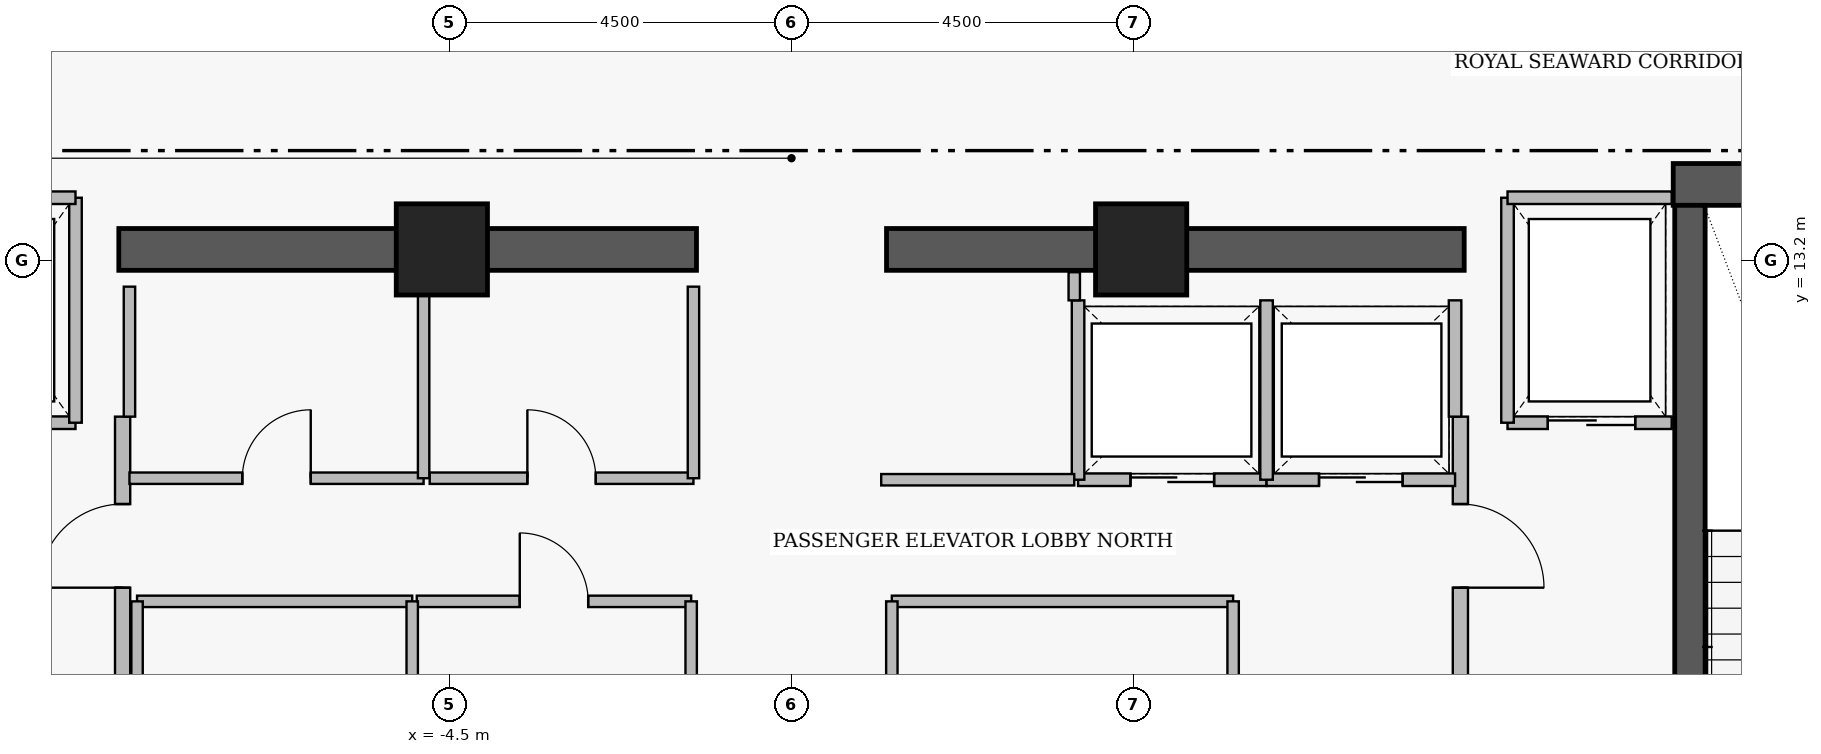
"""IFC4 building model, lengths in metres.
Left out: names, types, materials, properties, quantities, classifications, styles, units other than length and angle.
Written with IfcOpenShell. Run it as: python <this file> out.ifc"""

import sys

from ifc_helpers import new_model, si_unit, direction, frame, frame_2d, origin, origin_2d, place, context, subcontext, project, spatial, rectangle, extrude, element, fill, save


model = new_model("IFC4")
c1 = context("Model", 3, precision=1e-05, world=origin(), true_north=direction((0.0, 1.0)))
c2 = subcontext(c1, "Body", "Model", "MODEL_VIEW")
j1 = project(units=[si_unit("LENGTHUNIT", "METRE"), si_unit("PLANEANGLEUNIT", "RADIAN")], contexts=[c1])
p1 = place(None, origin())
s1 = spatial("IfcSite", under=j1, at=p1, CompositionType="ELEMENT")
p2 = place(p1, origin())
s2 = spatial("IfcBuilding", under=s1, at=p2, CompositionType="ELEMENT")
p3 = place(p2, frame((0.0, 0.0, 250.75)))
s3 = spatial("IfcBuildingStorey", under=s2, at=p3, CompositionType="ELEMENT", Elevation=250.75)
p4 = place(p3, frame((11.6, 14.205, 0.0), z_axis=(0.0, 0.0, 1.0), x_axis=(1.0, 0.0, 0.0)))
e1 = element("IfcWall", 1, at=p4, inside=s3, PredefinedType="SHEAR", context=c2, shape_type="SweptSolid", body=[
    extrude(rectangle(XDim=4.36, YDim=0.55, at=frame_2d((2.18, 0.0))), origin(), (0.0, 0.0, 1.0), 3.51),
])
for number, where, z_axis, x_axis in (
    (2, (-8.85, 13.35, 0.0), (0.0, 0.0, 1.0), (1.0, 0.0, 0.0)),
    (3, (1.25, 13.35, 0.0), (0.0, 0.0, 1.0), (1.0, 0.0, 0.0)),
):
    element("IfcWall", number, at=place(p3, frame(where, z_axis=z_axis, x_axis=x_axis)), inside=s3, PredefinedType="SHEAR", context=c2, shape_type="SweptSolid", body=[
        extrude(rectangle(XDim=7.6, YDim=0.55, at=frame_2d((3.8, 0.0))), origin(), (0.0, 0.0, 1.0), 3.48),
    ])
p5 = place(p3, frame((11.82, 13.93, 0.0), z_axis=(0.0, 0.0, 1.0), x_axis=(0.0, -1.0, 0.0)))
e4 = element("IfcWall", 4, at=p5, inside=s3, PredefinedType="SHEAR", context=c2, shape_type="SweptSolid", body=[
    extrude(rectangle(XDim=8.96, YDim=0.4, at=frame_2d((4.48, 0.0))), origin(), (0.0, 0.0, 1.0), 3.51),
])
p6 = place(p5, frame((7.53, 0.0, 0.0)))
e5 = element("IfcOpeningElement", 5, at=p6, cuts=e4, PredefinedType="OPENING", context=c2, shape_type="SweptSolid", body=[
    extrude(rectangle(XDim=1.12, YDim=2.22, at=frame_2d((0.56, 1.11))), frame((0.0, 0.21, 0.0), z_axis=(0.0, -1.0, 0.0), x_axis=(1.0, 0.0, 0.0)), (0.0, 0.0, 1.0), 0.42),
])
for number, where, z_axis, x_axis in (
    (6, (-4.6, 13.35, 0.0), (0.0, 0.0, 1.0), (1.0, 0.0, 0.0)),
    (7, (4.6, 13.35, 0.0), (0.0, 0.0, 1.0), (1.0, 0.0, 0.0)),
):
    element("IfcColumn", number, at=place(p3, frame(where, z_axis=z_axis, x_axis=x_axis)), inside=s3, PredefinedType="COLUMN", context=c2, shape_type="SweptSolid", body=[
        extrude(rectangle(XDim=1.2, YDim=1.2, at=origin_2d()), origin(), (0.0, 0.0, 1.0), 3.7),
    ])
p7 = place(p3, frame((-8.8, 5.05, 0.0), z_axis=(0.0, 0.0, 1.0), x_axis=(0.0, 1.0, 0.0)))
e8 = element("IfcWall", 8, at=p7, inside=s3, PredefinedType="PARTITIONING", context=c2, shape_type="SweptSolid", body=[
    extrude(rectangle(XDim=6.1, YDim=0.2, at=frame_2d((3.05, 0.0))), origin(), (0.0, 0.0, 1.0), 3.48),
])
p8 = place(p7, frame((0.25, 0.0, 0.0)))
e9 = element("IfcOpeningElement", 9, at=p8, cuts=e8, PredefinedType="OPENING", context=c2, shape_type="SweptSolid", body=[
    extrude(rectangle(XDim=1.1, YDim=2.2, at=frame_2d((0.55, 1.1))), frame((0.0, 0.11, 0.0), z_axis=(0.0, -1.0, 0.0), x_axis=(1.0, 0.0, 0.0)), (0.0, 0.0, 1.0), 0.22),
])
p9 = place(p7, frame((3.85, 0.0, 0.0)))
e10 = element("IfcOpeningElement", 10, at=p9, cuts=e8, PredefinedType="OPENING", context=c2, shape_type="SweptSolid", body=[
    extrude(rectangle(XDim=1.1, YDim=2.2, at=frame_2d((0.55, 1.1))), frame((0.0, 0.11, 0.0), z_axis=(0.0, -1.0, 0.0), x_axis=(1.0, 0.0, 0.0)), (0.0, 0.0, 1.0), 0.22),
])
p10 = place(p3, frame((8.8, 11.15, 0.0), z_axis=(0.0, 0.0, 1.0), x_axis=(0.0, -1.0, 0.0)))
e11 = element("IfcWall", 11, at=p10, inside=s3, PredefinedType="PARTITIONING", context=c2, shape_type="SweptSolid", body=[
    extrude(rectangle(XDim=6.1, YDim=0.2, at=frame_2d((3.05, 0.0))), origin(), (0.0, 0.0, 1.0), 3.48),
])
p11 = place(p10, frame((1.15, 0.0, 0.0)))
e12 = element("IfcOpeningElement", 12, at=p11, cuts=e11, PredefinedType="OPENING", context=c2, shape_type="SweptSolid", body=[
    extrude(rectangle(XDim=1.1, YDim=2.2, at=frame_2d((0.55, 1.1))), frame((0.0, 0.11, 0.0), z_axis=(0.0, -1.0, 0.0), x_axis=(1.0, 0.0, 0.0)), (0.0, 0.0, 1.0), 0.22),
])
p12 = place(p10, frame((4.75, 0.0, 0.0)))
e13 = element("IfcOpeningElement", 13, at=p12, cuts=e11, PredefinedType="OPENING", context=c2, shape_type="SweptSolid", body=[
    extrude(rectangle(XDim=1.1, YDim=2.2, at=frame_2d((0.55, 1.1))), frame((0.0, 0.11, 0.0), z_axis=(0.0, -1.0, 0.0), x_axis=(1.0, 0.0, 0.0)), (0.0, 0.0, 1.0), 0.22),
])
p13 = place(p3, frame((-11.58, 11.07, 0.0), z_axis=(0.0, 0.0, 1.0), x_axis=(1.0, 0.0, 0.0)))
e14 = element("IfcWall", 14, at=p13, inside=s3, PredefinedType="PARTITIONING", context=c2, shape_type="SweptSolid", body=[
    extrude(rectangle(XDim=2.16, YDim=0.165, at=frame_2d((1.08, 0.0))), origin(), (0.0, 0.0, 1.0), 3.48),
])
p14 = place(p13, frame((0.53, 0.0, 0.0)))
e15 = element("IfcOpeningElement", 15, at=p14, cuts=e14, PredefinedType="OPENING", context=c2, shape_type="SweptSolid", body=[
    extrude(rectangle(XDim=1.15, YDim=2.25, at=frame_2d((0.575, 1.125))), frame((0.0, 0.093, 0.0), z_axis=(0.0, -1.0, 0.0), x_axis=(1.0, 0.0, 0.0)), (0.0, 0.0, 1.0), 0.185),
])
p15 = place(p3, frame((9.42, 11.07, 0.0), z_axis=(0.0, 0.0, 1.0), x_axis=(1.0, 0.0, 0.0)))
e16 = element("IfcWall", 16, at=p15, inside=s3, PredefinedType="PARTITIONING", context=c2, shape_type="SweptSolid", body=[
    extrude(rectangle(XDim=2.16, YDim=0.165, at=frame_2d((1.08, 0.0))), origin(), (0.0, 0.0, 1.0), 3.48),
])
p16 = place(p15, frame((0.53, 0.0, 0.0)))
e17 = element("IfcOpeningElement", 17, at=p16, cuts=e16, PredefinedType="OPENING", context=c2, shape_type="SweptSolid", body=[
    extrude(rectangle(XDim=1.15, YDim=2.25, at=frame_2d((0.575, 1.125))), frame((0.0, 0.093, 0.0), z_axis=(0.0, -1.0, 0.0), x_axis=(1.0, 0.0, 0.0)), (0.0, 0.0, 1.0), 0.185),
])
p17 = place(p3, frame((3.77, 10.32, 0.0), z_axis=(0.0, 0.0, 1.0), x_axis=(1.0, 0.0, 0.0)))
e18 = element("IfcWall", 18, at=p17, inside=s3, PredefinedType="PARTITIONING", context=c2, shape_type="SweptSolid", body=[
    extrude(rectangle(XDim=2.48, YDim=0.165, at=frame_2d((1.24, 0.0))), origin(), (0.0, 0.0, 1.0), 3.48),
])
p18 = place(p17, frame((0.69, 0.0, 0.0)))
e19 = element("IfcOpeningElement", 19, at=p18, cuts=e18, PredefinedType="OPENING", context=c2, shape_type="SweptSolid", body=[
    extrude(rectangle(XDim=1.1, YDim=2.25, at=frame_2d((0.55, 1.125))), frame((0.0, 0.093, 0.0), z_axis=(0.0, -1.0, 0.0), x_axis=(1.0, 0.0, 0.0)), (0.0, 0.0, 1.0), 0.185),
])
p19 = place(p3, frame((6.25, 10.32, 0.0), z_axis=(0.0, 0.0, 1.0), x_axis=(1.0, 0.0, 0.0)))
e20 = element("IfcWall", 20, at=p19, inside=s3, PredefinedType="PARTITIONING", context=c2, shape_type="SweptSolid", body=[
    extrude(rectangle(XDim=2.48, YDim=0.165, at=frame_2d((1.24, 0.0))), origin(), (0.0, 0.0, 1.0), 3.48),
])
p20 = place(p19, frame((0.69, 0.0, 0.0)))
e21 = element("IfcOpeningElement", 21, at=p20, cuts=e20, PredefinedType="OPENING", context=c2, shape_type="SweptSolid", body=[
    extrude(rectangle(XDim=1.1, YDim=2.25, at=frame_2d((0.55, 1.125))), frame((0.0, 0.093, 0.0), z_axis=(0.0, -1.0, 0.0), x_axis=(1.0, 0.0, 0.0)), (0.0, 0.0, 1.0), 0.185),
])
p21 = place(p3, frame((-8.71, 10.34, 0.0), z_axis=(0.0, 0.0, 1.0), x_axis=(1.0, 0.0, 0.0)))
e22 = element("IfcWall", 22, at=p21, inside=s3, PredefinedType="PARTITIONING", context=c2, shape_type="SweptSolid", body=[
    extrude(rectangle(XDim=3.87, YDim=0.15, at=frame_2d((1.935, 0.0))), origin(), (0.0, 0.0, 1.0), 3.48),
])
p22 = place(p21, frame((1.485, 0.0, 0.0)))
e23 = element("IfcOpeningElement", 23, at=p22, cuts=e22, PredefinedType="OPENING", context=c2, shape_type="SweptSolid", body=[
    extrude(rectangle(XDim=0.9, YDim=2.15, at=frame_2d((0.45, 1.075))), frame((0.0, 0.085, 0.0), z_axis=(0.0, -1.0, 0.0), x_axis=(1.0, 0.0, 0.0)), (0.0, 0.0, 1.0), 0.17),
])
p23 = place(p3, frame((-4.76, 10.34, 0.0), z_axis=(0.0, 0.0, 1.0), x_axis=(1.0, 0.0, 0.0)))
e24 = element("IfcWall", 24, at=p23, inside=s3, PredefinedType="PARTITIONING", context=c2, shape_type="SweptSolid", body=[
    extrude(rectangle(XDim=3.47, YDim=0.15, at=frame_2d((1.735, 0.0))), origin(), (0.0, 0.0, 1.0), 3.48),
])
p24 = place(p23, frame((1.285, 0.0, 0.0)))
e25 = element("IfcOpeningElement", 25, at=p24, cuts=e24, PredefinedType="OPENING", context=c2, shape_type="SweptSolid", body=[
    extrude(rectangle(XDim=0.9, YDim=2.15, at=frame_2d((0.45, 1.075))), frame((0.0, 0.085, 0.0), z_axis=(0.0, -1.0, 0.0), x_axis=(1.0, 0.0, 0.0)), (0.0, 0.0, 1.0), 0.17),
])
p25 = place(p3, frame((-4.93, 8.72, 0.0), z_axis=(0.0, 0.0, 1.0), x_axis=(1.0, 0.0, 0.0)))
e26 = element("IfcWall", 26, at=p25, inside=s3, PredefinedType="PARTITIONING", context=c2, shape_type="SweptSolid", body=[
    extrude(rectangle(XDim=3.61, YDim=0.15, at=frame_2d((1.805, 0.0))), origin(), (0.0, 0.0, 1.0), 3.48),
])
p26 = place(p25, frame((1.355, 0.0, 0.0)))
e27 = element("IfcOpeningElement", 27, at=p26, cuts=e26, PredefinedType="OPENING", context=c2, shape_type="SweptSolid", body=[
    extrude(rectangle(XDim=0.9, YDim=2.15, at=frame_2d((0.45, 1.075))), frame((0.0, 0.085, 0.0), z_axis=(0.0, -1.0, 0.0), x_axis=(1.0, 0.0, 0.0)), (0.0, 0.0, 1.0), 0.17),
])
p27 = place(p3, frame((-9.42, 11.07, 0.0), z_axis=(0.0, 0.0, 1.0), x_axis=(0.0, 1.0, 0.0)))
e28 = element("IfcWall", 28, at=p27, inside=s3, PredefinedType="PARTITIONING", context=c2, shape_type="SweptSolid", body=[
    extrude(rectangle(XDim=2.96, YDim=0.165, at=frame_2d((1.48, 0.0))), origin(), (0.0, 0.0, 1.0), 3.48),
])
p28 = place(p3, frame((-11.58, 14.03, 0.0), z_axis=(0.0, 0.0, 1.0), x_axis=(1.0, 0.0, 0.0)))
e29 = element("IfcWall", 29, at=p28, inside=s3, PredefinedType="PARTITIONING", context=c2, shape_type="SweptSolid", body=[
    extrude(rectangle(XDim=2.16, YDim=0.165, at=frame_2d((1.08, 0.0))), origin(), (0.0, 0.0, 1.0), 3.48),
])
p29 = place(p3, frame((9.42, 11.07, 0.0), z_axis=(0.0, 0.0, 1.0), x_axis=(0.0, 1.0, 0.0)))
e30 = element("IfcWall", 30, at=p29, inside=s3, PredefinedType="PARTITIONING", context=c2, shape_type="SweptSolid", body=[
    extrude(rectangle(XDim=2.96, YDim=0.165, at=frame_2d((1.48, 0.0))), origin(), (0.0, 0.0, 1.0), 3.48),
])
p30 = place(p3, frame((9.42, 14.03, 0.0), z_axis=(0.0, 0.0, 1.0), x_axis=(1.0, 0.0, 0.0)))
e31 = element("IfcWall", 31, at=p30, inside=s3, PredefinedType="PARTITIONING", context=c2, shape_type="SweptSolid", body=[
    extrude(rectangle(XDim=2.16, YDim=0.165, at=frame_2d((1.08, 0.0))), origin(), (0.0, 0.0, 1.0), 3.48),
])
for number, where, z_axis, x_axis in (
    (32, (3.77, 10.32, 0.0), (0.0, 0.0, 1.0), (0.0, 1.0, 0.0)),
    (33, (6.25, 10.32, 0.0), (0.0, 0.0, 1.0), (0.0, 1.0, 0.0)),
):
    element("IfcWall", number, at=place(p3, frame(where, z_axis=z_axis, x_axis=x_axis)), inside=s3, PredefinedType="PARTITIONING", context=c2, shape_type="SweptSolid", body=[
        extrude(rectangle(XDim=2.36, YDim=0.165, at=frame_2d((1.18, 0.0))), origin(), (0.0, 0.0, 1.0), 3.48),
    ])
p31 = place(p3, frame((8.73, 11.15, 0.0), z_axis=(0.0, 0.0, 1.0), x_axis=(0.0, 1.0, 0.0)))
e34 = element("IfcWall", 34, at=p31, inside=s3, PredefinedType="PARTITIONING", context=c2, shape_type="SweptSolid", body=[
    extrude(rectangle(XDim=1.53, YDim=0.165, at=frame_2d((0.765, 0.0))), origin(), (0.0, 0.0, 1.0), 3.48),
])
p32 = place(p3, frame((-8.71, 11.15, 0.0), z_axis=(0.0, 0.0, 1.0), x_axis=(0.0, 1.0, 0.0)))
e35 = element("IfcWall", 35, at=p32, inside=s3, PredefinedType="PARTITIONING", context=c2, shape_type="SweptSolid", body=[
    extrude(rectangle(XDim=1.71, YDim=0.15, at=frame_2d((0.855, 0.0))), origin(), (0.0, 0.0, 1.0), 3.48),
])
for number, where, z_axis, x_axis in (
    (36, (-4.84, 10.34, 0.0), (0.0, 0.0, 1.0), (0.0, 1.0, 0.0)),
    (37, (-1.29, 10.34, 0.0), (0.0, 0.0, 1.0), (0.0, 1.0, 0.0)),
):
    element("IfcWall", number, at=place(p3, frame(where, z_axis=z_axis, x_axis=x_axis)), inside=s3, PredefinedType="PARTITIONING", context=c2, shape_type="SweptSolid", body=[
        extrude(rectangle(XDim=2.52, YDim=0.15, at=frame_2d((1.26, 0.0))), origin(), (0.0, 0.0, 1.0), 3.48),
    ])
p33 = place(p3, frame((-8.61, 8.72, 0.0), z_axis=(0.0, 0.0, 1.0), x_axis=(1.0, 0.0, 0.0)))
e38 = element("IfcWall", 38, at=p33, inside=s3, PredefinedType="PARTITIONING", context=c2, shape_type="SweptSolid", body=[
    extrude(rectangle(XDim=3.62, YDim=0.15, at=frame_2d((1.81, 0.0))), origin(), (0.0, 0.0, 1.0), 3.48),
])
for number, where, z_axis, x_axis in (
    (39, (-8.61, 6.48, 0.0), (0.0, 0.0, 1.0), (0.0, 1.0, 0.0)),
    (40, (-4.99, 6.48, 0.0), (0.0, 0.0, 1.0), (0.0, 1.0, 0.0)),
    (41, (-1.32, 6.48, 0.0), (0.0, 0.0, 1.0), (0.0, 1.0, 0.0)),
):
    element("IfcWall", number, at=place(p3, frame(where, z_axis=z_axis, x_axis=x_axis)), inside=s3, PredefinedType="PARTITIONING", context=c2, shape_type="SweptSolid", body=[
        extrude(rectangle(XDim=2.24, YDim=0.15, at=frame_2d((1.12, 0.0))), origin(), (0.0, 0.0, 1.0), 3.48),
    ])
p34 = place(p3, frame((1.32, 8.72, 0.0), z_axis=(0.0, 0.0, 1.0), x_axis=(1.0, 0.0, 0.0)))
e42 = element("IfcWall", 42, at=p34, inside=s3, PredefinedType="PARTITIONING", context=c2, shape_type="SweptSolid", body=[
    extrude(rectangle(XDim=4.49, YDim=0.15, at=frame_2d((2.245, 0.0))), origin(), (0.0, 0.0, 1.0), 3.48),
])
for number, where, z_axis, x_axis in (
    (43, (1.32, 6.48, 0.0), (0.0, 0.0, 1.0), (0.0, 1.0, 0.0)),
    (44, (5.81, 6.48, 0.0), (0.0, 0.0, 1.0), (0.0, 1.0, 0.0)),
):
    element("IfcWall", number, at=place(p3, frame(where, z_axis=z_axis, x_axis=x_axis)), inside=s3, PredefinedType="PARTITIONING", context=c2, shape_type="SweptSolid", body=[
        extrude(rectangle(XDim=2.24, YDim=0.15, at=frame_2d((1.12, 0.0))), origin(), (0.0, 0.0, 1.0), 3.48),
    ])
p35 = place(p3, frame((1.18, 10.32, 0.0), z_axis=(0.0, 0.0, 1.0), x_axis=(1.0, 0.0, 0.0)))
e45 = element("IfcWall", 45, at=p35, inside=s3, PredefinedType="PARTITIONING", context=c2, shape_type="SweptSolid", body=[
    extrude(rectangle(XDim=2.54, YDim=0.15, at=frame_2d((1.27, 0.0))), origin(), (0.0, 0.0, 1.0), 3.48),
])
p36 = place(p3, frame((3.72, 12.68, 0.0), z_axis=(0.0, 0.0, 1.0), x_axis=(0.0, 1.0, 0.0)))
e46 = element("IfcWall", 46, at=p36, inside=s3, PredefinedType="PARTITIONING", context=c2, shape_type="SweptSolid", body=[
    extrude(rectangle(XDim=0.37, YDim=0.15, at=frame_2d((0.185, 0.0))), origin(), (0.0, 0.0, 1.0), 3.48),
])
p37 = place(p9, origin())
e47 = element("IfcDoor", 47, at=p37, inside=s3, OperationType="SINGLE_SWING_LEFT", PredefinedType="DOOR", context=c2, shape_type="SweptSolid", body=[
    extrude(rectangle(XDim=1.1, YDim=2.2, at=frame_2d((0.55, 1.1))), frame((0.0, 0.025, 0.0), z_axis=(0.0, -1.0, 0.0), x_axis=(1.0, 0.0, 0.0)), (0.0, 0.0, 1.0), 0.05),
])
fill(e10, e47)
p38 = place(p11, origin())
e48 = element("IfcDoor", 48, at=p38, inside=s3, OperationType="SINGLE_SWING_RIGHT", PredefinedType="DOOR", context=c2, shape_type="SweptSolid", body=[
    extrude(rectangle(XDim=1.1, YDim=2.2, at=frame_2d((0.55, 1.1))), frame((0.0, 0.025, 0.0), z_axis=(0.0, -1.0, 0.0), x_axis=(1.0, 0.0, 0.0)), (0.0, 0.0, 1.0), 0.05),
])
fill(e12, e48)
p39 = place(p16, origin())
e49 = element("IfcDoor", 49, at=p39, inside=s3, OperationType="SLIDING_TO_LEFT", PredefinedType="DOOR", context=c2, shape_type="SweptSolid", body=[
    extrude(rectangle(XDim=1.15, YDim=2.25, at=frame_2d((0.575, 1.125))), frame((0.0, 0.025, 0.0), z_axis=(0.0, -1.0, 0.0), x_axis=(1.0, 0.0, 0.0)), (0.0, 0.0, 1.0), 0.05),
])
fill(e17, e49)
p40 = place(p18, origin())
e50 = element("IfcDoor", 50, at=p40, inside=s3, OperationType="SLIDING_TO_LEFT", PredefinedType="DOOR", context=c2, shape_type="SweptSolid", body=[
    extrude(rectangle(XDim=1.1, YDim=2.25, at=frame_2d((0.55, 1.125))), frame((0.0, 0.025, 0.0), z_axis=(0.0, -1.0, 0.0), x_axis=(1.0, 0.0, 0.0)), (0.0, 0.0, 1.0), 0.05),
])
fill(e19, e50)
p41 = place(p20, origin())
e51 = element("IfcDoor", 51, at=p41, inside=s3, OperationType="SLIDING_TO_LEFT", PredefinedType="DOOR", context=c2, shape_type="SweptSolid", body=[
    extrude(rectangle(XDim=1.1, YDim=2.25, at=frame_2d((0.55, 1.125))), frame((0.0, 0.025, 0.0), z_axis=(0.0, -1.0, 0.0), x_axis=(1.0, 0.0, 0.0)), (0.0, 0.0, 1.0), 0.05),
])
fill(e21, e51)
p42 = place(p22, origin())
e52 = element("IfcDoor", 52, at=p42, inside=s3, OperationType="SINGLE_SWING_RIGHT", PredefinedType="DOOR", context=c2, shape_type="SweptSolid", body=[
    extrude(rectangle(XDim=0.9, YDim=2.15, at=frame_2d((0.45, 1.075))), frame((0.0, 0.025, 0.0), z_axis=(0.0, -1.0, 0.0), x_axis=(1.0, 0.0, 0.0)), (0.0, 0.0, 1.0), 0.05),
])
fill(e23, e52)
p43 = place(p24, origin())
e53 = element("IfcDoor", 53, at=p43, inside=s3, OperationType="SINGLE_SWING_LEFT", PredefinedType="DOOR", context=c2, shape_type="SweptSolid", body=[
    extrude(rectangle(XDim=0.9, YDim=2.15, at=frame_2d((0.45, 1.075))), frame((0.0, 0.025, 0.0), z_axis=(0.0, -1.0, 0.0), x_axis=(1.0, 0.0, 0.0)), (0.0, 0.0, 1.0), 0.05),
])
fill(e25, e53)
p44 = place(p26, origin())
e54 = element("IfcDoor", 54, at=p44, inside=s3, OperationType="SINGLE_SWING_LEFT", PredefinedType="DOOR", context=c2, shape_type="SweptSolid", body=[
    extrude(rectangle(XDim=0.9, YDim=2.15, at=frame_2d((0.45, 1.075))), frame((0.0, 0.025, 0.0), z_axis=(0.0, -1.0, 0.0), x_axis=(1.0, 0.0, 0.0)), (0.0, 0.0, 1.0), 0.05),
])
fill(e27, e54)
save(model, sys.argv[1])
